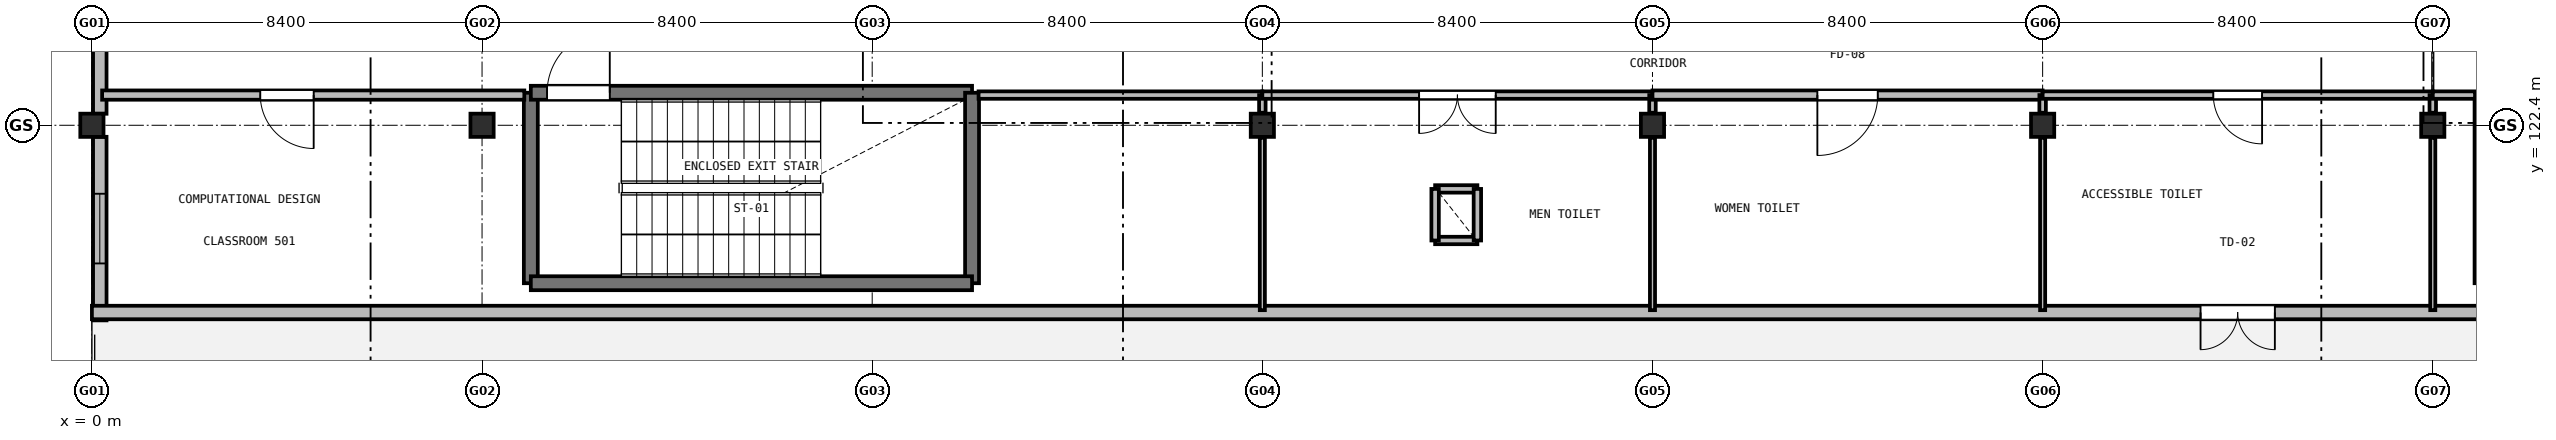
"""IFC4 building model, lengths in metres.
Left out: names, types, materials, properties, quantities, classifications, styles, units other than length and angle.
Written with IfcOpenShell. Run it as: python <this file> out.ifc"""

import sys

from ifc_helpers import new_model, si_unit, direction, frame, frame_2d, origin, origin_2d, place, context, subcontext, project, spatial, rectangle, extrude, element, fill, save


model = new_model("IFC4")
c1 = context("Model", 3, precision=1e-05, world=origin(), true_north=direction((0.0, 1.0)))
c2 = subcontext(c1, "Body", "Model", "MODEL_VIEW")
j1 = project(units=[si_unit("LENGTHUNIT", "METRE"), si_unit("PLANEANGLEUNIT", "RADIAN")], contexts=[c1])
p1 = place(None, origin())
s1 = spatial("IfcSite", under=j1, at=p1, CompositionType="ELEMENT")
p2 = place(p1, origin())
s2 = spatial("IfcBuilding", under=s1, at=p2, CompositionType="ELEMENT")
p3 = place(p2, frame((0.0, 0.0, 21.9)))
s3 = spatial("IfcBuildingStorey", under=s2, at=p3, CompositionType="ELEMENT", Elevation=21.9)
for number, where, z_axis, x_axis in (
    (1, (0.0, 122.4, 0.0), (0.0, 0.0, 1.0), (1.0, 0.0, 0.0)),
    (2, (8.4, 122.4, 0.0), (0.0, 0.0, 1.0), (1.0, 0.0, 0.0)),
    (3, (25.2, 122.4, 0.0), (0.0, 0.0, 1.0), (1.0, 0.0, 0.0)),
    (4, (33.6, 122.4, 0.0), (0.0, 0.0, 1.0), (1.0, 0.0, 0.0)),
    (5, (42.0, 122.4, 0.0), (0.0, 0.0, 1.0), (1.0, 0.0, 0.0)),
    (6, (50.4, 122.4, 0.0), (0.0, 0.0, 1.0), (1.0, 0.0, 0.0)),
):
    element("IfcColumn", number, at=place(p3, frame(where, z_axis=z_axis, x_axis=x_axis)), inside=s3, PredefinedType="COLUMN", context=c2, shape_type="SweptSolid", body=[
        extrude(rectangle(XDim=0.5, YDim=0.5, at=origin_2d()), origin(), (0.0, 0.0, 1.0), 4.2),
    ])
p4 = place(p3, frame((0.17, 118.2, 0.0), z_axis=(0.0, 0.0, 1.0), x_axis=(0.0, 1.0, 0.0)))
e7 = element("IfcWall", 7, at=p4, inside=s3, PredefinedType="SOLIDWALL", context=c2, shape_type="SweptSolid", body=[
    extrude(rectangle(XDim=3.952, YDim=0.29, at=frame_2d((1.976, 0.0))), origin(), (0.0, 0.0, 1.0), 3.86),
])
p5 = place(p4, frame((1.226, 0.0, 0.95)))
e8 = element("IfcOpeningElement", 8, at=p5, cuts=e7, PredefinedType="OPENING", context=c2, shape_type="SweptSolid", body=[
    extrude(rectangle(XDim=1.5, YDim=1.4, at=frame_2d((0.75, 0.7))), frame((0.0, 0.155, 0.0), z_axis=(0.0, -1.0, 0.0), x_axis=(1.0, 0.0, 0.0)), (0.0, 0.0, 1.0), 0.31),
])
p6 = place(p3, frame((0.17, 122.648, 0.0), z_axis=(0.0, 0.0, 1.0), x_axis=(0.0, 1.0, 0.0)))
e9 = element("IfcWall", 9, at=p6, inside=s3, PredefinedType="SOLIDWALL", context=c2, shape_type="SweptSolid", body=[
    extrude(rectangle(XDim=6.704, YDim=0.29, at=frame_2d((3.352, 0.0))), origin(), (0.0, 0.0, 1.0), 3.46),
])
p7 = place(p3, frame((100.8, 118.37, 0.0), z_axis=(0.0, 0.0, 1.0), x_axis=(-1.0, 0.0, 0.0)))
e10 = element("IfcWall", 10, at=p7, inside=s3, PredefinedType="SOLIDWALL", context=c2, shape_type="SweptSolid", body=[
    extrude(rectangle(XDim=100.8, YDim=0.29, at=frame_2d((50.4, 0.0))), origin(), (0.0, 0.0, 1.0), 3.86),
])
p8 = place(p7, frame((53.8, 0.0, 0.0)))
e11 = element("IfcOpeningElement", 11, at=p8, cuts=e10, PredefinedType="OPENING", context=c2, shape_type="SweptSolid", body=[
    extrude(rectangle(XDim=1.6, YDim=2.2, at=frame_2d((0.8, 1.1))), frame((0.0, 0.155, 0.0), z_axis=(0.0, -1.0, 0.0), x_axis=(1.0, 0.0, 0.0)), (0.0, 0.0, 1.0), 0.31),
])
p9 = place(p7, frame((20.2, 0.0, 0.0)))
e12 = element("IfcOpeningElement", 12, at=p9, cuts=e10, PredefinedType="OPENING", context=c2, shape_type="SweptSolid", body=[
    extrude(rectangle(XDim=1.6, YDim=2.2, at=frame_2d((0.8, 1.1))), frame((0.0, 0.155, 0.0), z_axis=(0.0, -1.0, 0.0), x_axis=(1.0, 0.0, 0.0)), (0.0, 0.0, 1.0), 0.31),
])
p10 = place(p3, frame((9.45, 119.0, 0.0), z_axis=(0.0, 0.0, 1.0), x_axis=(0.0, 1.0, 0.0)))
e13 = element("IfcWall", 13, at=p10, inside=s3, PredefinedType="SHEAR", context=c2, shape_type="SweptSolid", body=[
    extrude(rectangle(XDim=4.1, YDim=0.3, at=frame_2d((2.05, 0.0))), origin(), (0.0, 0.0, 1.0), 3.88),
])
p11 = place(p3, frame((9.45, 123.1, 0.0), z_axis=(0.0, 0.0, 1.0), x_axis=(1.0, 0.0, 0.0)))
e14 = element("IfcWall", 14, at=p11, inside=s3, PredefinedType="SHEAR", context=c2, shape_type="SweptSolid", body=[
    extrude(rectangle(XDim=9.5, YDim=0.3, at=frame_2d((4.75, 0.0))), origin(), (0.0, 0.0, 1.0), 3.88),
])
p12 = place(p11, frame((0.35, 0.0, 0.0)))
e15 = element("IfcOpeningElement", 15, at=p12, cuts=e14, PredefinedType="OPENING", context=c2, shape_type="SweptSolid", body=[
    extrude(rectangle(XDim=1.35, YDim=2.2, at=frame_2d((0.675, 1.1))), frame((0.0, 0.16, 0.0), z_axis=(0.0, -1.0, 0.0), x_axis=(1.0, 0.0, 0.0)), (0.0, 0.0, 1.0), 0.32),
])
p13 = place(p3, frame((18.95, 123.1, 0.0), z_axis=(0.0, 0.0, 1.0), x_axis=(0.0, -1.0, 0.0)))
e16 = element("IfcWall", 16, at=p13, inside=s3, PredefinedType="SHEAR", context=c2, shape_type="SweptSolid", body=[
    extrude(rectangle(XDim=4.1, YDim=0.3, at=frame_2d((2.05, 0.0))), origin(), (0.0, 0.0, 1.0), 3.88),
])
p14 = place(p3, frame((18.95, 119.0, 0.0), z_axis=(0.0, 0.0, 1.0), x_axis=(-1.0, 0.0, 0.0)))
e17 = element("IfcWall", 17, at=p14, inside=s3, PredefinedType="SHEAR", context=c2, shape_type="SweptSolid", body=[
    extrude(rectangle(XDim=9.5, YDim=0.3, at=frame_2d((4.75, 0.0))), origin(), (0.0, 0.0, 1.0), 3.88),
])
p15 = place(p3, frame((51.45, 119.0, 0.0), z_axis=(0.0, 0.0, 1.0), x_axis=(0.0, 1.0, 0.0)))
e18 = element("IfcWall", 18, at=p15, inside=s3, PredefinedType="SHEAR", context=c2, shape_type="SweptSolid", body=[
    extrude(rectangle(XDim=4.1, YDim=0.3, at=frame_2d((2.05, 0.0))), origin(), (0.0, 0.0, 1.0), 3.88),
])
for number, where, z_axis, x_axis in (
    (19, (28.92, 119.92, 0.0), (0.0, 0.0, 1.0), (1.0, 0.0, 0.0)),
    (20, (29.83, 121.03, 0.0), (0.0, 0.0, 1.0), (-1.0, 0.0, 0.0)),
):
    element("IfcWall", number, at=place(p3, frame(where, z_axis=z_axis, x_axis=x_axis)), inside=s3, PredefinedType="PARTITIONING", context=c2, shape_type="SweptSolid", body=[
        extrude(rectangle(XDim=0.91, YDim=0.16, at=frame_2d((0.455, 0.0))), origin(), (0.0, 0.0, 1.0), 3.65),
    ])
for number, where, z_axis, x_axis in (
    (21, (28.92, 121.03, 0.0), (0.0, 0.0, 1.0), (0.0, -1.0, 0.0)),
    (22, (29.83, 119.92, 0.0), (0.0, 0.0, 1.0), (0.0, 1.0, 0.0)),
):
    element("IfcWall", number, at=place(p3, frame(where, z_axis=z_axis, x_axis=x_axis)), inside=s3, PredefinedType="PARTITIONING", context=c2, shape_type="SweptSolid", body=[
        extrude(rectangle(XDim=1.11, YDim=0.16, at=frame_2d((0.555, 0.0))), origin(), (0.0, 0.0, 1.0), 3.65),
    ])
p16 = place(p3, frame((25.2, 123.05, 0.0), z_axis=(0.0, 0.0, 1.0), x_axis=(-1.0, 0.0, 0.0)))
e23 = element("IfcWall", 23, at=p16, inside=s3, PredefinedType="PARTITIONING", context=c2, shape_type="SweptSolid", body=[
    extrude(rectangle(XDim=6.11, YDim=0.16, at=frame_2d((3.055, 0.0))), origin(), (0.0, 0.0, 1.0), 3.455),
])
p17 = place(p3, frame((9.31, 123.05, 0.0), z_axis=(0.0, 0.0, 1.0), x_axis=(-1.0, 0.0, 0.0)))
e24 = element("IfcWall", 24, at=p17, inside=s3, PredefinedType="SOLIDWALL", context=c2, shape_type="SweptSolid", body=[
    extrude(rectangle(XDim=9.09, YDim=0.2, at=frame_2d((4.545, 0.0))), origin(), (0.0, 0.0, 1.0), 3.455),
])
p18 = place(p17, frame((4.535, 0.0, 0.0)))
e25 = element("IfcOpeningElement", 25, at=p18, cuts=e24, PredefinedType="OPENING", context=c2, shape_type="SweptSolid", body=[
    extrude(rectangle(XDim=1.15, YDim=2.15, at=frame_2d((0.575, 1.075))), frame((0.0, 0.11, 0.0), z_axis=(0.0, -1.0, 0.0), x_axis=(1.0, 0.0, 0.0)), (0.0, 0.0, 1.0), 0.22),
])
p19 = place(p3, frame((25.2, 118.42, 0.0), z_axis=(0.0, 0.0, 1.0), x_axis=(0.0, 1.0, 0.0)))
e26 = element("IfcWall", 26, at=p19, inside=s3, PredefinedType="PARTITIONING", context=c2, shape_type="SweptSolid", body=[
    extrude(rectangle(XDim=3.71, YDim=0.11, at=frame_2d((1.855, 0.0))), origin(), (0.0, 0.0, 1.0), 3.305),
])
p20 = place(p3, frame((25.2, 122.67, 0.0), z_axis=(0.0, 0.0, 1.0), x_axis=(0.0, 1.0, 0.0)))
e27 = element("IfcWall", 27, at=p20, inside=s3, PredefinedType="PARTITIONING", context=c2, shape_type="SweptSolid", body=[
    extrude(rectangle(XDim=0.38, YDim=0.14, at=frame_2d((0.19, 0.0))), origin(), (0.0, 0.0, 1.0), 3.305),
])
p21 = place(p3, frame((33.6, 123.05, 0.0), z_axis=(0.0, 0.0, 1.0), x_axis=(-1.0, 0.0, 0.0)))
e28 = element("IfcWall", 28, at=p21, inside=s3, PredefinedType="PARTITIONING", context=c2, shape_type="SweptSolid", body=[
    extrude(rectangle(XDim=8.4, YDim=0.16, at=frame_2d((4.2, 0.0))), origin(), (0.0, 0.0, 1.0), 3.455),
])
p22 = place(p21, frame((3.375, 0.0, 0.0)))
e29 = element("IfcOpeningElement", 29, at=p22, cuts=e28, PredefinedType="OPENING", context=c2, shape_type="SweptSolid", body=[
    extrude(rectangle(XDim=1.65, YDim=2.2, at=frame_2d((0.825, 1.1))), frame((0.0, 0.09, 0.0), z_axis=(0.0, -1.0, 0.0), x_axis=(1.0, 0.0, 0.0)), (0.0, 0.0, 1.0), 0.18),
])
p23 = place(p3, frame((33.6, 118.42, 0.0), z_axis=(0.0, 0.0, 1.0), x_axis=(0.0, 1.0, 0.0)))
e30 = element("IfcWall", 30, at=p23, inside=s3, PredefinedType="PARTITIONING", context=c2, shape_type="SweptSolid", body=[
    extrude(rectangle(XDim=3.71, YDim=0.11, at=frame_2d((1.855, 0.0))), origin(), (0.0, 0.0, 1.0), 3.305),
])
p24 = place(p3, frame((33.6, 122.67, 0.0), z_axis=(0.0, 0.0, 1.0), x_axis=(0.0, 1.0, 0.0)))
e31 = element("IfcWall", 31, at=p24, inside=s3, PredefinedType="PARTITIONING", context=c2, shape_type="SweptSolid", body=[
    extrude(rectangle(XDim=0.38, YDim=0.14, at=frame_2d((0.19, 0.0))), origin(), (0.0, 0.0, 1.0), 3.305),
])
p25 = place(p3, frame((42.0, 123.05, 0.0), z_axis=(0.0, 0.0, 1.0), x_axis=(-1.0, 0.0, 0.0)))
e32 = element("IfcWall", 32, at=p25, inside=s3, PredefinedType="SOLIDWALL", context=c2, shape_type="SweptSolid", body=[
    extrude(rectangle(XDim=8.4, YDim=0.2, at=frame_2d((4.2, 0.0))), origin(), (0.0, 0.0, 1.0), 3.455),
])
p26 = place(p25, frame((3.55, 0.0, 0.0)))
e33 = element("IfcOpeningElement", 33, at=p26, cuts=e32, PredefinedType="OPENING", context=c2, shape_type="SweptSolid", body=[
    extrude(rectangle(XDim=1.3, YDim=2.15, at=frame_2d((0.65, 1.075))), frame((0.0, 0.11, 0.0), z_axis=(0.0, -1.0, 0.0), x_axis=(1.0, 0.0, 0.0)), (0.0, 0.0, 1.0), 0.22),
])
p27 = place(p3, frame((42.0, 118.42, 0.0), z_axis=(0.0, 0.0, 1.0), x_axis=(0.0, 1.0, 0.0)))
e34 = element("IfcWall", 34, at=p27, inside=s3, PredefinedType="PARTITIONING", context=c2, shape_type="SweptSolid", body=[
    extrude(rectangle(XDim=3.71, YDim=0.11, at=frame_2d((1.855, 0.0))), origin(), (0.0, 0.0, 1.0), 3.305),
])
p28 = place(p3, frame((42.0, 122.67, 0.0), z_axis=(0.0, 0.0, 1.0), x_axis=(0.0, 1.0, 0.0)))
e35 = element("IfcWall", 35, at=p28, inside=s3, PredefinedType="PARTITIONING", context=c2, shape_type="SweptSolid", body=[
    extrude(rectangle(XDim=0.38, YDim=0.14, at=frame_2d((0.19, 0.0))), origin(), (0.0, 0.0, 1.0), 3.305),
])
p29 = place(p3, frame((50.4, 123.05, 0.0), z_axis=(0.0, 0.0, 1.0), x_axis=(-1.0, 0.0, 0.0)))
e36 = element("IfcWall", 36, at=p29, inside=s3, PredefinedType="PARTITIONING", context=c2, shape_type="SweptSolid", body=[
    extrude(rectangle(XDim=8.4, YDim=0.16, at=frame_2d((4.2, 0.0))), origin(), (0.0, 0.0, 1.0), 3.455),
])
p30 = place(p29, frame((3.675, 0.0, 0.0)))
e37 = element("IfcOpeningElement", 37, at=p30, cuts=e36, PredefinedType="OPENING", context=c2, shape_type="SweptSolid", body=[
    extrude(rectangle(XDim=1.05, YDim=2.15, at=frame_2d((0.525, 1.075))), frame((0.0, 0.09, 0.0), z_axis=(0.0, -1.0, 0.0), x_axis=(1.0, 0.0, 0.0)), (0.0, 0.0, 1.0), 0.18),
])
p31 = place(p3, frame((50.4, 118.42, 0.0), z_axis=(0.0, 0.0, 1.0), x_axis=(0.0, 1.0, 0.0)))
e38 = element("IfcWall", 38, at=p31, inside=s3, PredefinedType="PARTITIONING", context=c2, shape_type="SweptSolid", body=[
    extrude(rectangle(XDim=3.71, YDim=0.11, at=frame_2d((1.855, 0.0))), origin(), (0.0, 0.0, 1.0), 3.305),
])
p32 = place(p3, frame((50.4, 122.67, 0.0), z_axis=(0.0, 0.0, 1.0), x_axis=(0.0, 1.0, 0.0)))
e39 = element("IfcWall", 39, at=p32, inside=s3, PredefinedType="PARTITIONING", context=c2, shape_type="SweptSolid", body=[
    extrude(rectangle(XDim=0.38, YDim=0.14, at=frame_2d((0.19, 0.0))), origin(), (0.0, 0.0, 1.0), 3.305),
])
p33 = place(p3, frame((51.31, 123.05, 0.0), z_axis=(0.0, 0.0, 1.0), x_axis=(-1.0, 0.0, 0.0)))
e40 = element("IfcWall", 40, at=p33, inside=s3, PredefinedType="PARTITIONING", context=c2, shape_type="SweptSolid", body=[
    extrude(rectangle(XDim=0.91, YDim=0.16, at=frame_2d((0.455, 0.0))), origin(), (0.0, 0.0, 1.0), 3.455),
])
p34 = place(p5, origin())
e41 = element("IfcWindow", 41, at=p34, inside=s3, PartitioningType="SINGLE_PANEL", PredefinedType="WINDOW", context=c2, shape_type="SweptSolid", body=[
    extrude(rectangle(XDim=1.5, YDim=1.4, at=frame_2d((0.75, 0.7))), frame((0.0, 0.03, 0.0), z_axis=(0.0, -1.0, 0.0), x_axis=(1.0, 0.0, 0.0)), (0.0, 0.0, 1.0), 0.06),
])
fill(e8, e41)
p35 = place(p8, origin())
e42 = element("IfcDoor", 42, at=p35, inside=s3, OperationType="DOUBLE_DOOR_SINGLE_SWING", PredefinedType="DOOR", context=c2, shape_type="SweptSolid", body=[
    extrude(rectangle(XDim=1.6, YDim=2.2, at=frame_2d((0.8, 1.1))), frame((0.0, 0.025, 0.0), z_axis=(0.0, -1.0, 0.0), x_axis=(1.0, 0.0, 0.0)), (0.0, 0.0, 1.0), 0.05),
])
fill(e11, e42)
p36 = place(p12, origin())
e43 = element("IfcDoor", 43, at=p36, inside=s3, OperationType="SINGLE_SWING_RIGHT", PredefinedType="DOOR", context=c2, shape_type="SweptSolid", body=[
    extrude(rectangle(XDim=1.35, YDim=2.2, at=frame_2d((0.675, 1.1))), frame((0.0, 0.025, 0.0), z_axis=(0.0, -1.0, 0.0), x_axis=(1.0, 0.0, 0.0)), (0.0, 0.0, 1.0), 0.05),
])
fill(e15, e43)
p37 = place(p18, origin())
e44 = element("IfcDoor", 44, at=p37, inside=s3, OperationType="SINGLE_SWING_LEFT", PredefinedType="DOOR", context=c2, shape_type="SweptSolid", body=[
    extrude(rectangle(XDim=1.15, YDim=2.15, at=frame_2d((0.575, 1.075))), frame((0.0, 0.025, 0.0), z_axis=(0.0, -1.0, 0.0), x_axis=(1.0, 0.0, 0.0)), (0.0, 0.0, 1.0), 0.05),
])
fill(e25, e44)
p38 = place(p22, origin())
e45 = element("IfcDoor", 45, at=p38, inside=s3, OperationType="DOUBLE_DOOR_SINGLE_SWING", PredefinedType="DOOR", context=c2, shape_type="SweptSolid", body=[
    extrude(rectangle(XDim=1.65, YDim=2.2, at=frame_2d((0.825, 1.1))), frame((0.0, 0.025, 0.0), z_axis=(0.0, -1.0, 0.0), x_axis=(1.0, 0.0, 0.0)), (0.0, 0.0, 1.0), 0.05),
])
fill(e29, e45)
p39 = place(p26, origin())
e46 = element("IfcDoor", 46, at=p39, inside=s3, OperationType="SINGLE_SWING_RIGHT", PredefinedType="DOOR", context=c2, shape_type="SweptSolid", body=[
    extrude(rectangle(XDim=1.3, YDim=2.15, at=frame_2d((0.65, 1.075))), frame((0.0, 0.025, 0.0), z_axis=(0.0, -1.0, 0.0), x_axis=(1.0, 0.0, 0.0)), (0.0, 0.0, 1.0), 0.05),
])
fill(e33, e46)
p40 = place(p30, origin())
e47 = element("IfcDoor", 47, at=p40, inside=s3, OperationType="SINGLE_SWING_LEFT", PredefinedType="DOOR", context=c2, shape_type="SweptSolid", body=[
    extrude(rectangle(XDim=1.05, YDim=2.15, at=frame_2d((0.525, 1.075))), frame((0.0, 0.025, 0.0), z_axis=(0.0, -1.0, 0.0), x_axis=(1.0, 0.0, 0.0)), (0.0, 0.0, 1.0), 0.05),
])
fill(e37, e47)
save(model, sys.argv[1])
